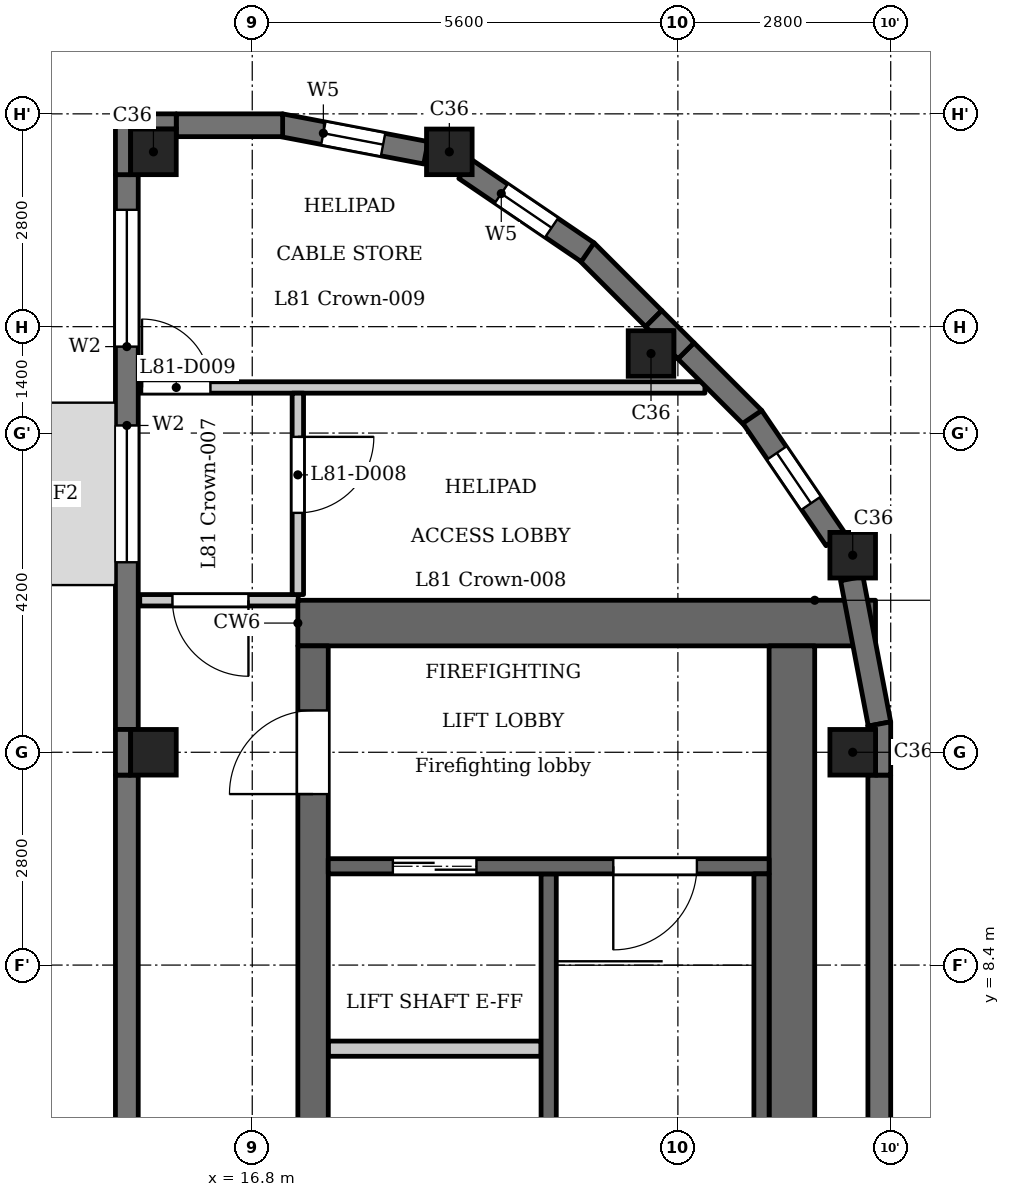
"""IFC4 building model, lengths in metres.
Left out: names, types, materials, properties, quantities, classifications, styles, units other than length and angle.
Written with IfcOpenShell. Run it as: python <this file> out.ifc"""

import sys

from ifc_helpers import new_model, si_unit, direction, frame, frame_2d, origin, origin_2d, place, context, subcontext, project, spatial, polyline, rectangle, outline, extrude, element, fill, save


model = new_model("IFC4")
c1 = context("Model", 3, precision=1e-05, world=origin(), true_north=direction((0.0, 1.0)))
c2 = subcontext(c1, "Body", "Model", "MODEL_VIEW")
j1 = project(units=[si_unit("LENGTHUNIT", "METRE"), si_unit("PLANEANGLEUNIT", "RADIAN")], contexts=[c1])
p1 = place(None, origin())
s1 = spatial("IfcSite", under=j1, at=p1, CompositionType="ELEMENT")
p2 = place(p1, origin())
s2 = spatial("IfcBuilding", under=s1, at=p2, CompositionType="ELEMENT")
p3 = place(p2, frame((0.0, 0.0, 313.9)))
s3 = spatial("IfcBuildingStorey", under=s2, at=p3, CompositionType="ELEMENT", Elevation=313.9)
for number, where, z_axis, x_axis in (
    (1, (15.5, 11.2, 0.0), (0.0, 0.0, 1.0), (1.0, 0.0, 0.0)),
    (2, (15.5, 19.1, 0.0), (0.0, 0.0, 1.0), (1.0, 0.0, 0.0)),
    (3, (19.393, 19.1, 0.0), (0.0, 0.0, 1.0), (1.0, 0.0, 0.0)),
    (4, (22.046, 16.446, 0.0), (0.0, 0.0, 1.0), (1.0, 0.0, 0.0)),
    (5, (24.7, 11.2, 0.0), (0.0, 0.0, 1.0), (1.0, 0.0, 0.0)),
    (6, (24.7, 13.793, 0.0), (0.0, 0.0, 1.0), (1.0, 0.0, 0.0)),
):
    element("IfcColumn", number, at=place(p3, frame(where, z_axis=z_axis, x_axis=x_axis)), inside=s3, PredefinedType="COLUMN", context=c2, shape_type="SweptSolid", body=[
        extrude(rectangle(XDim=0.6, YDim=0.6, at=origin_2d()), origin(), (0.0, 0.0, 1.0), 3.5),
    ])
p4 = place(p3, frame((15.15, 18.8, 0.0), z_axis=(0.0, 0.0, 1.0), x_axis=(0.0, -1.0, 0.0)))
e7 = element("IfcWall", 7, at=p4, inside=s3, PredefinedType="SOLIDWALL", context=c2, shape_type="SweptSolid", body=[
    extrude(rectangle(XDim=7.3, YDim=0.3, at=frame_2d((3.65, 0.0))), origin(), (0.0, 0.0, 1.0), 3.2),
])
p5 = place(p4, frame((0.462, 0.0, 0.9)))
e8 = element("IfcOpeningElement", 8, at=p5, cuts=e7, PredefinedType="OPENING", context=c2, shape_type="SweptSolid", body=[
    extrude(rectangle(XDim=1.8, YDim=1.25, at=frame_2d((0.9, 0.625))), frame((0.0, 0.16, 0.0), z_axis=(0.0, -1.0, 0.0), x_axis=(1.0, 0.0, 0.0)), (0.0, 0.0, 1.0), 0.32),
])
p6 = place(p4, frame((3.3, 0.0, 0.9)))
e9 = element("IfcOpeningElement", 9, at=p6, cuts=e7, PredefinedType="OPENING", context=c2, shape_type="SweptSolid", body=[
    extrude(rectangle(XDim=1.8, YDim=1.25, at=frame_2d((0.9, 0.625))), frame((0.0, 0.16, 0.0), z_axis=(0.0, -1.0, 0.0), x_axis=(1.0, 0.0, 0.0)), (0.0, 0.0, 1.0), 0.32),
])
for number, where, z_axis, x_axis in (
    (10, (15.15, 10.9, 0.0), (0.0, 0.0, 1.0), (0.0, -1.0, 0.0)),
    (11, (25.05, 5.9, 0.0), (0.0, 0.0, 1.0), (0.0, 1.0, 0.0)),
):
    element("IfcWall", number, at=place(p3, frame(where, z_axis=z_axis, x_axis=x_axis)), inside=s3, PredefinedType="SOLIDWALL", context=c2, shape_type="SweptSolid", body=[
        extrude(rectangle(XDim=5.0, YDim=0.3, at=frame_2d((2.5, 0.0))), origin(), (0.0, 0.0, 1.0), 3.2),
    ])
p7 = place(p3, frame((25.052, 11.573, 0.0), z_axis=(0.0, 0.0, 1.0), x_axis=(-0.187354129902, 0.982292436095, 0.0)))
e12 = element("IfcWall", 12, at=p7, inside=s3, PredefinedType="SOLIDWALL", context=c2, shape_type="SweptSolid", body=[
    extrude(rectangle(XDim=1.947, YDim=0.3, at=frame_2d((0.973, 0.0))), origin(), (0.0, 0.0, 1.0), 2.6),
])
p8 = place(p3, frame((24.474, 14.002, 0.0), z_axis=(0.0, 0.0, 1.0), x_axis=(-0.562025435703, 0.827119948752, 0.0)))
e13 = element("IfcWall", 13, at=p8, inside=s3, PredefinedType="SOLIDWALL", context=c2, shape_type="SweptSolid", body=[
    extrude(rectangle(XDim=1.948, YDim=0.3, at=frame_2d((0.974, 0.0))), origin(), (0.0, 0.0, 1.0), 2.6),
])
p9 = place(p8, frame((0.574, 0.0, 0.6)))
e14 = element("IfcOpeningElement", 14, at=p9, cuts=e13, PredefinedType="OPENING", context=c2, shape_type="SweptSolid", body=[
    extrude(rectangle(XDim=0.8, YDim=1.55, at=frame_2d((0.4, 0.775))), frame((0.0, 0.16, 0.0), z_axis=(0.0, -1.0, 0.0), x_axis=(1.0, 0.0, 0.0)), (0.0, 0.0, 1.0), 0.32),
])
for number, where, z_axis, x_axis in (
    (15, (23.397, 15.591, 0.0), (0.0, 0.0, 1.0), (-0.707, 0.707, 0.0)),
    (16, (22.082, 16.906, 0.0), (0.0, 0.0, 1.0), (-0.707, 0.707, 0.0)),
):
    element("IfcWall", number, at=place(p3, frame(where, z_axis=z_axis, x_axis=x_axis)), inside=s3, PredefinedType="SOLIDWALL", context=c2, shape_type="SweptSolid", body=[
        extrude(rectangle(XDim=1.26, YDim=0.3, at=frame_2d((0.63, 0.0))), origin(), (0.0, 0.0, 1.0), 3.2),
    ])
p10 = place(p3, frame((21.213, 17.779, 0.0), z_axis=(0.0, 0.0, 1.0), x_axis=(-0.827022075481, 0.562169446579, 0.0)))
e17 = element("IfcWall", 17, at=p10, inside=s3, PredefinedType="SOLIDWALL", context=c2, shape_type="SweptSolid", body=[
    extrude(rectangle(XDim=1.948, YDim=0.3, at=frame_2d((0.974, 0.0))), origin(), (0.0, 0.0, 1.0), 2.6),
])
p11 = place(p10, frame((0.574, 0.0, 0.6)))
e18 = element("IfcOpeningElement", 18, at=p11, cuts=e17, PredefinedType="OPENING", context=c2, shape_type="SweptSolid", body=[
    extrude(rectangle(XDim=0.8, YDim=1.55, at=frame_2d((0.4, 0.775))), frame((0.0, 0.16, 0.0), z_axis=(0.0, -1.0, 0.0), x_axis=(1.0, 0.0, 0.0)), (0.0, 0.0, 1.0), 0.32),
])
p12 = place(p3, frame((19.085, 19.088, 0.0), z_axis=(0.0, 0.0, 1.0), x_axis=(-0.982286967073, 0.187382801553, 0.0)))
e19 = element("IfcWall", 19, at=p12, inside=s3, PredefinedType="SOLIDWALL", context=c2, shape_type="SweptSolid", body=[
    extrude(rectangle(XDim=1.948, YDim=0.3, at=frame_2d((0.974, 0.0))), origin(), (0.0, 0.0, 1.0), 2.6),
])
p13 = place(p12, frame((0.574, 0.0, 0.6)))
e20 = element("IfcOpeningElement", 20, at=p13, cuts=e19, PredefinedType="OPENING", context=c2, shape_type="SweptSolid", body=[
    extrude(rectangle(XDim=0.8, YDim=1.55, at=frame_2d((0.4, 0.775))), frame((0.0, 0.16, 0.0), z_axis=(0.0, -1.0, 0.0), x_axis=(1.0, 0.0, 0.0)), (0.0, 0.0, 1.0), 0.32),
])
p14 = place(p3, frame((17.2, 19.45, 0.0), z_axis=(0.0, 0.0, 1.0), x_axis=(-1.0, 0.0, 0.0)))
e21 = element("IfcWall", 21, at=p14, inside=s3, PredefinedType="SOLIDWALL", context=c2, shape_type="SweptSolid", body=[
    extrude(rectangle(XDim=1.4, YDim=0.3, at=frame_2d((0.7, 0.0))), origin(), (0.0, 0.0, 1.0), 3.2),
])
p15 = place(p3, frame((0.0, 0.0, 3.5)))
e22 = element("IfcWall", 22, at=p15, inside=s3, PredefinedType="PARAPET", context=c2, shape_type="SweptSolid", body=[
    extrude(outline(polyline([(15.0, 19.6), (15.0, -19.6), (17.2, -19.6), (19.424, -19.176), (21.297, -17.903), (23.503, -15.697), (24.776, -13.824), (25.2, -11.6), (25.2, 11.6), (24.776, 13.824), (23.503, 15.697), (21.297, 17.903), (19.424, 19.176), (17.2, 19.6), (15.0, 19.6)]), holes=[polyline([(17.172, -19.3), (15.3, -19.3), (15.3, 19.3), (17.172, 19.3), (19.307, 18.893), (21.105, 17.671), (23.271, 15.505), (24.493, 13.707), (24.9, 11.572), (24.9, -11.572), (24.493, -13.707), (23.271, -15.505), (21.105, -17.671), (19.307, -18.893), (17.172, -19.3)])]), origin(), (0.0, 0.0, 1.0), 1.5),
])
p16 = place(p3, frame((20.7, 2.6, 0.0), z_axis=(0.0, 0.0, 1.0), x_axis=(0.0, 1.0, 0.0)))
e23 = element("IfcWall", 23, at=p16, inside=s3, PredefinedType="SHEAR", context=c2, shape_type="SweptSolid", body=[
    extrude(rectangle(XDim=7.0, YDim=0.2, at=frame_2d((3.5, 0.0))), origin(), (0.0, 0.0, 1.0), 3.2),
])
p17 = place(p3, frame((17.4, 12.9, 0.0), z_axis=(0.0, 0.0, 1.0), x_axis=(1.0, 0.0, 0.0)))
e24 = element("IfcWall", 24, at=p17, inside=s3, PredefinedType="SHEAR", context=c2, shape_type="SweptSolid", body=[
    extrude(rectangle(XDim=7.6, YDim=0.6, at=frame_2d((3.8, 0.0))), origin(), (0.0, 0.0, 1.0), 3.2),
])
p18 = place(p3, frame((17.6, -12.6, 0.0), z_axis=(0.0, 0.0, 1.0), x_axis=(0.0, 1.0, 0.0)))
e25 = element("IfcWall", 25, at=p18, inside=s3, PredefinedType="SHEAR", context=c2, shape_type="SweptSolid", body=[
    extrude(rectangle(XDim=25.2, YDim=0.4, at=frame_2d((12.6, 0.0))), origin(), (0.0, 0.0, 1.0), 3.2),
])
p19 = place(p18, frame((8.8, 0.0, 0.0)))
e26 = element("IfcOpeningElement", 26, at=p19, cuts=e25, PredefinedType="OPENING", context=c2, shape_type="SweptSolid", body=[
    extrude(rectangle(XDim=0.9, YDim=2.1, at=frame_2d((0.45, 1.05))), frame((0.0, 0.21, 0.0), z_axis=(0.0, -1.0, 0.0), x_axis=(1.0, 0.0, 0.0)), (0.0, 0.0, 1.0), 0.42),
])
p20 = place(p18, frame((17.05, 0.0, 0.0)))
e27 = element("IfcOpeningElement", 27, at=p20, cuts=e25, PredefinedType="OPENING", context=c2, shape_type="SweptSolid", body=[
    extrude(rectangle(XDim=0.9, YDim=2.1, at=frame_2d((0.45, 1.05))), frame((0.0, 0.21, 0.0), z_axis=(0.0, -1.0, 0.0), x_axis=(1.0, 0.0, 0.0)), (0.0, 0.0, 1.0), 0.42),
])
p21 = place(p18, frame((23.25, 0.0, 0.0)))
e28 = element("IfcOpeningElement", 28, at=p21, cuts=e25, PredefinedType="OPENING", context=c2, shape_type="SweptSolid", body=[
    extrude(rectangle(XDim=1.1, YDim=2.1, at=frame_2d((0.55, 1.05))), frame((0.0, 0.21, 0.0), z_axis=(0.0, -1.0, 0.0), x_axis=(1.0, 0.0, 0.0)), (0.0, 0.0, 1.0), 0.42),
])
p22 = place(p18, frame((0.85, 0.0, 0.0)))
e29 = element("IfcOpeningElement", 29, at=p22, cuts=e25, PredefinedType="OPENING", context=c2, shape_type="SweptSolid", body=[
    extrude(rectangle(XDim=1.1, YDim=2.1, at=frame_2d((0.55, 1.05))), frame((0.0, 0.21, 0.0), z_axis=(0.0, -1.0, 0.0), x_axis=(1.0, 0.0, 0.0)), (0.0, 0.0, 1.0), 0.42),
])
p23 = place(p18, frame((13.075, 0.0, 0.0)))
e30 = element("IfcOpeningElement", 30, at=p23, cuts=e25, PredefinedType="OPENING", context=c2, shape_type="SweptSolid", body=[
    extrude(rectangle(XDim=1.8, YDim=2.1, at=frame_2d((0.9, 1.05))), frame((0.0, 0.21, 0.0), z_axis=(0.0, -1.0, 0.0), x_axis=(1.0, 0.0, 0.0)), (0.0, 0.0, 1.0), 0.42),
])
p24 = place(p3, frame((23.9, -12.6, 0.0), z_axis=(0.0, 0.0, 1.0), x_axis=(0.0, 1.0, 0.0)))
e31 = element("IfcWall", 31, at=p24, inside=s3, PredefinedType="SHEAR", context=c2, shape_type="SweptSolid", body=[
    extrude(rectangle(XDim=25.2, YDim=0.6, at=frame_2d((12.6, 0.0))), origin(), (0.0, 0.0, 1.0), 3.2),
])
p25 = place(p3, frame((17.8, 7.3, 0.0), z_axis=(0.0, 0.0, 1.0), x_axis=(1.0, 0.0, 0.0)))
e32 = element("IfcWall", 32, at=p25, inside=s3, PredefinedType="PARTITIONING", context=c2, shape_type="SweptSolid", body=[
    extrude(rectangle(XDim=2.8, YDim=0.2, at=frame_2d((1.4, 0.0))), origin(), (0.0, 0.0, 1.0), 3.2),
])
p26 = place(p3, frame((17.8, 9.7, 0.0), z_axis=(0.0, 0.0, 1.0), x_axis=(1.0, 0.0, 0.0)))
e33 = element("IfcWall", 33, at=p26, inside=s3, PredefinedType="SHEAR", context=c2, shape_type="SweptSolid", body=[
    extrude(rectangle(XDim=5.8, YDim=0.2, at=frame_2d((2.9, 0.0))), origin(), (0.0, 0.0, 1.0), 3.2),
])
p27 = place(p26, frame((0.85, 0.0, 0.0)))
e34 = element("IfcOpeningElement", 34, at=p27, cuts=e33, PredefinedType="OPENING", context=c2, shape_type="SweptSolid", body=[
    extrude(rectangle(XDim=1.1, YDim=2.1, at=frame_2d((0.55, 1.05))), frame((0.0, 0.11, 0.0), z_axis=(0.0, -1.0, 0.0), x_axis=(1.0, 0.0, 0.0)), (0.0, 0.0, 1.0), 0.22),
])
p28 = place(p26, frame((3.75, 0.0, 0.0)))
e35 = element("IfcOpeningElement", 35, at=p28, cuts=e33, PredefinedType="OPENING", context=c2, shape_type="SweptSolid", body=[
    extrude(rectangle(XDim=1.1, YDim=2.1, at=frame_2d((0.55, 1.05))), frame((0.0, 0.11, 0.0), z_axis=(0.0, -1.0, 0.0), x_axis=(1.0, 0.0, 0.0)), (0.0, 0.0, 1.0), 0.22),
])
p29 = place(p3, frame((23.5, 2.6, 0.0), z_axis=(0.0, 0.0, 1.0), x_axis=(0.0, 1.0, 0.0)))
e36 = element("IfcWall", 36, at=p29, inside=s3, PredefinedType="SHEAR", context=c2, shape_type="SweptSolid", body=[
    extrude(rectangle(XDim=7.0, YDim=0.2, at=frame_2d((3.5, 0.0))), origin(), (0.0, 0.0, 1.0), 3.2),
])
p30 = place(p3, frame((15.32, 13.2, 0.0), z_axis=(0.0, 0.0, 1.0), x_axis=(1.0, 0.0, 0.0)))
e37 = element("IfcWall", 37, at=p30, inside=s3, PredefinedType="PARTITIONING", context=c2, shape_type="SweptSolid", body=[
    extrude(rectangle(XDim=2.085, YDim=0.15, at=frame_2d((1.042, 0.0))), origin(), (0.0, 0.0, 1.0), 3.2),
])
p31 = place(p30, frame((0.43, 0.0, 0.0)))
e38 = element("IfcOpeningElement", 38, at=p31, cuts=e37, PredefinedType="OPENING", context=c2, shape_type="SweptSolid", body=[
    extrude(rectangle(XDim=1.0, YDim=2.1, at=frame_2d((0.5, 1.05))), frame((0.0, 0.085, 0.0), z_axis=(0.0, -1.0, 0.0), x_axis=(1.0, 0.0, 0.0)), (0.0, 0.0, 1.0), 0.17),
])
p32 = place(p3, frame((15.32, 16.0, 0.0), z_axis=(0.0, 0.0, 1.0), x_axis=(1.0, 0.0, 0.0)))
e39 = element("IfcWall", 39, at=p32, inside=s3, PredefinedType="PARTITIONING", context=c2, shape_type="SweptSolid", body=[
    extrude(rectangle(XDim=7.436, YDim=0.15, at=frame_2d((3.718, 0.0))), origin(), (0.0, 0.0, 1.0), 3.2),
])
p33 = place(p32, frame((0.03, 0.0, 0.0)))
e40 = element("IfcOpeningElement", 40, at=p33, cuts=e39, PredefinedType="OPENING", context=c2, shape_type="SweptSolid", body=[
    extrude(rectangle(XDim=0.9, YDim=2.1, at=frame_2d((0.45, 1.05))), frame((0.0, 0.085, 0.0), z_axis=(0.0, -1.0, 0.0), x_axis=(1.0, 0.0, 0.0)), (0.0, 0.0, 1.0), 0.17),
])
p34 = place(p3, frame((17.4, 13.275, 0.0), z_axis=(0.0, 0.0, 1.0), x_axis=(0.0, 1.0, 0.0)))
e41 = element("IfcWall", 41, at=p34, inside=s3, PredefinedType="PARTITIONING", context=c2, shape_type="SweptSolid", body=[
    extrude(rectangle(XDim=2.65, YDim=0.15, at=frame_2d((1.325, 0.0))), origin(), (0.0, 0.0, 1.0), 3.2),
])
p35 = place(p34, frame((1.075, 0.0, 0.0)))
e42 = element("IfcOpeningElement", 42, at=p35, cuts=e41, PredefinedType="OPENING", context=c2, shape_type="SweptSolid", body=[
    extrude(rectangle(XDim=1.0, YDim=2.1, at=frame_2d((0.5, 1.05))), frame((0.0, 0.085, 0.0), z_axis=(0.0, -1.0, 0.0), x_axis=(1.0, 0.0, 0.0)), (0.0, 0.0, 1.0), 0.17),
])
p36 = place(p3, origin())
e43 = element("IfcWall", 43, at=p36, inside=s3, PredefinedType="SOLIDWALL", context=c2, shape_type="SweptSolid", body=[
    extrude(outline(polyline([(22.4, 16.376), (22.612, 16.588), (22.188, 17.012), (21.976, 16.8), (22.029, 16.746), (22.346, 16.746), (22.346, 16.429), (22.4, 16.376)])), origin(), (0.0, 0.0, 1.0), 3.2),
])
e44 = element("IfcWall", 44, at=p36, inside=s3, PredefinedType="SOLIDWALL", context=c2, shape_type="SweptSolid", body=[
    extrude(outline(polyline([(25.2, 10.9), (25.2, 11.601), (24.903, 11.544), (24.9, 11.561), (24.9, 11.5), (25.0, 11.5), (25.0, 10.9), (25.2, 10.9)])), origin(), (0.0, 0.0, 1.0), 3.2),
])
e45 = element("IfcWall", 45, at=p36, inside=s3, PredefinedType="SOLIDWALL", context=c2, shape_type="SweptSolid", body=[
    extrude(outline(polyline([(15.2, 11.5), (15.0, 11.5), (15.0, 10.9), (15.2, 10.9), (15.2, 11.5)])), origin(), (0.0, 0.0, 1.0), 3.2),
])
e46 = element("IfcWall", 46, at=p36, inside=s3, PredefinedType="SOLIDWALL", context=c2, shape_type="SweptSolid", body=[
    extrude(outline(polyline([(15.8, 19.6), (15.0, 19.6), (15.0, 18.8), (15.2, 18.8), (15.2, 19.4), (15.8, 19.4), (15.8, 19.6)])), origin(), (0.0, 0.0, 1.0), 3.2),
])
p37 = place(p27, origin())
e47 = element("IfcDoor", 47, at=p37, inside=s3, OperationType="DOUBLE_DOOR_SLIDING", PredefinedType="DOOR", context=c2, shape_type="SweptSolid", body=[
    extrude(rectangle(XDim=1.1, YDim=2.1, at=frame_2d((0.55, 1.05))), frame((0.0, 0.025, 0.0), z_axis=(0.0, -1.0, 0.0), x_axis=(1.0, 0.0, 0.0)), (0.0, 0.0, 1.0), 0.05),
])
fill(e34, e47)
p38 = place(p21, origin())
e48 = element("IfcDoor", 48, at=p38, inside=s3, OperationType="SINGLE_SWING_RIGHT", PredefinedType="DOOR", context=c2, shape_type="SweptSolid", body=[
    extrude(rectangle(XDim=1.1, YDim=2.1, at=frame_2d((0.55, 1.05))), frame((0.0, 0.025, 0.0), z_axis=(0.0, -1.0, 0.0), x_axis=(1.0, 0.0, 0.0)), (0.0, 0.0, 1.0), 0.05),
])
fill(e28, e48)
p39 = place(p28, origin())
e49 = element("IfcDoor", 49, at=p39, inside=s3, OperationType="SINGLE_SWING_LEFT", PredefinedType="DOOR", context=c2, shape_type="SweptSolid", body=[
    extrude(rectangle(XDim=1.1, YDim=2.1, at=frame_2d((0.55, 1.05))), frame((0.0, 0.025, 0.0), z_axis=(0.0, -1.0, 0.0), x_axis=(1.0, 0.0, 0.0)), (0.0, 0.0, 1.0), 0.05),
])
fill(e35, e49)
p40 = place(p31, origin())
e50 = element("IfcDoor", 50, at=p40, inside=s3, OperationType="SINGLE_SWING_RIGHT", PredefinedType="DOOR", context=c2, shape_type="SweptSolid", body=[
    extrude(rectangle(XDim=1.0, YDim=2.1, at=frame_2d((0.5, 1.05))), frame((0.0, 0.025, 0.0), z_axis=(0.0, -1.0, 0.0), x_axis=(1.0, 0.0, 0.0)), (0.0, 0.0, 1.0), 0.05),
])
fill(e38, e50)
p41 = place(p35, origin())
e51 = element("IfcDoor", 51, at=p41, inside=s3, OperationType="SINGLE_SWING_RIGHT", PredefinedType="DOOR", context=c2, shape_type="SweptSolid", body=[
    extrude(rectangle(XDim=1.0, YDim=2.1, at=frame_2d((0.5, 1.05))), frame((0.0, 0.025, 0.0), z_axis=(0.0, -1.0, 0.0), x_axis=(1.0, 0.0, 0.0)), (0.0, 0.0, 1.0), 0.05),
])
fill(e42, e51)
p42 = place(p33, origin())
e52 = element("IfcDoor", 52, at=p42, inside=s3, OperationType="SINGLE_SWING_RIGHT", PredefinedType="DOOR", context=c2, shape_type="SweptSolid", body=[
    extrude(rectangle(XDim=0.9, YDim=2.1, at=frame_2d((0.45, 1.05))), frame((0.0, 0.025, 0.0), z_axis=(0.0, -1.0, 0.0), x_axis=(1.0, 0.0, 0.0)), (0.0, 0.0, 1.0), 0.05),
])
fill(e40, e52)
p43 = place(p5, origin())
e53 = element("IfcWindow", 53, at=p43, inside=s3, PartitioningType="SINGLE_PANEL", PredefinedType="WINDOW", context=c2, shape_type="SweptSolid", body=[
    extrude(rectangle(XDim=1.8, YDim=1.25, at=frame_2d((0.9, 0.625))), frame((0.0, 0.03, 0.0), z_axis=(0.0, -1.0, 0.0), x_axis=(1.0, 0.0, 0.0)), (0.0, 0.0, 1.0), 0.06),
])
fill(e8, e53)
p44 = place(p6, origin())
e54 = element("IfcWindow", 54, at=p44, inside=s3, PartitioningType="SINGLE_PANEL", PredefinedType="WINDOW", context=c2, shape_type="SweptSolid", body=[
    extrude(rectangle(XDim=1.8, YDim=1.25, at=frame_2d((0.9, 0.625))), frame((0.0, 0.03, 0.0), z_axis=(0.0, -1.0, 0.0), x_axis=(1.0, 0.0, 0.0)), (0.0, 0.0, 1.0), 0.06),
])
fill(e9, e54)
p45 = place(p9, origin())
e55 = element("IfcWindow", 55, at=p45, inside=s3, PartitioningType="SINGLE_PANEL", PredefinedType="WINDOW", context=c2, shape_type="SweptSolid", body=[
    extrude(rectangle(XDim=0.8, YDim=1.55, at=frame_2d((0.4, 0.775))), frame((0.0, 0.03, 0.0), z_axis=(0.0, -1.0, 0.0), x_axis=(1.0, 0.0, 0.0)), (0.0, 0.0, 1.0), 0.06),
])
fill(e14, e55)
p46 = place(p11, origin())
e56 = element("IfcWindow", 56, at=p46, inside=s3, PartitioningType="SINGLE_PANEL", PredefinedType="WINDOW", context=c2, shape_type="SweptSolid", body=[
    extrude(rectangle(XDim=0.8, YDim=1.55, at=frame_2d((0.4, 0.775))), frame((0.0, 0.03, 0.0), z_axis=(0.0, -1.0, 0.0), x_axis=(1.0, 0.0, 0.0)), (0.0, 0.0, 1.0), 0.06),
])
fill(e18, e56)
p47 = place(p13, origin())
e57 = element("IfcWindow", 57, at=p47, inside=s3, PartitioningType="SINGLE_PANEL", PredefinedType="WINDOW", context=c2, shape_type="SweptSolid", body=[
    extrude(rectangle(XDim=0.8, YDim=1.55, at=frame_2d((0.4, 0.775))), frame((0.0, 0.03, 0.0), z_axis=(0.0, -1.0, 0.0), x_axis=(1.0, 0.0, 0.0)), (0.0, 0.0, 1.0), 0.06),
])
fill(e20, e57)
save(model, sys.argv[1])
